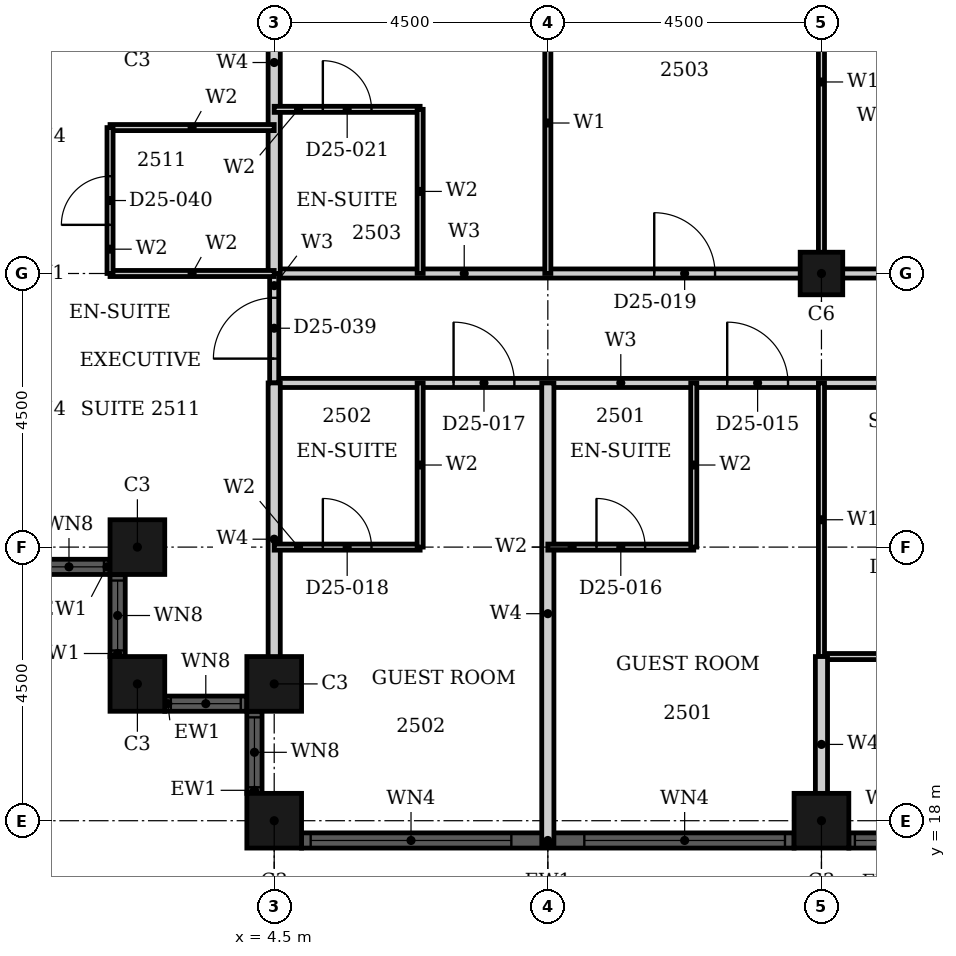
"""IFC4 building model, lengths in metres.
Left out: names, types, materials, properties, quantities, classifications, styles, units other than length and angle.
Written with IfcOpenShell. Run it as: python <this file> out.ifc"""

import sys

from ifc_helpers import new_model, si_unit, direction, frame, frame_2d, origin, origin_2d, place, context, subcontext, project, spatial, rectangle, hollow_rectangle, extrude, element, fill, save


model = new_model("IFC4")
c1 = context("Model", 3, precision=1e-05, world=origin(), true_north=direction((0.0, 1.0)))
c2 = subcontext(c1, "Body", "Model", "MODEL_VIEW")
j1 = project(units=[si_unit("LENGTHUNIT", "METRE"), si_unit("PLANEANGLEUNIT", "RADIAN")], contexts=[c1])
p1 = place(None, origin())
s1 = spatial("IfcSite", under=j1, at=p1, CompositionType="ELEMENT")
p2 = place(p1, origin())
s2 = spatial("IfcBuilding", under=s1, at=p2, CompositionType="ELEMENT")
p3 = place(p2, frame((0.0, 0.0, 104.4)))
s3 = spatial("IfcBuildingStorey", under=s2, at=p3, CompositionType="ELEMENT", Elevation=104.4)
for number, where, z_axis, x_axis in (
    (1, (2.25, 22.5, 0.0), (0.0, 0.0, 1.0), (1.0, 0.0, 0.0)),
    (2, (2.25, 20.25, 0.0), (0.0, 0.0, 1.0), (1.0, 0.0, 0.0)),
    (3, (4.5, 20.25, 0.0), (0.0, 0.0, 1.0), (1.0, 0.0, 0.0)),
    (4, (4.5, 18.0, 0.0), (0.0, 0.0, 1.0), (1.0, 0.0, 0.0)),
    (5, (13.5, 18.0, 0.0), (0.0, 0.0, 1.0), (1.0, 0.0, 0.0)),
):
    element("IfcColumn", number, at=place(p3, frame(where, z_axis=z_axis, x_axis=x_axis)), inside=s3, PredefinedType="COLUMN", context=c2, shape_type="SweptSolid", body=[
        extrude(hollow_rectangle(XDim=0.9, YDim=0.9, WallThickness=0.028, at=origin_2d()), origin(), (0.0, 0.0, 1.0), 3.6),
    ])
p4 = place(p3, frame((13.5, 27.0, 0.0), z_axis=(0.0, 0.0, 1.0), x_axis=(1.0, 0.0, 0.0)))
e6 = element("IfcColumn", 6, at=p4, inside=s3, PredefinedType="COLUMN", context=c2, shape_type="SweptSolid", body=[
    extrude(hollow_rectangle(XDim=0.7, YDim=0.7, WallThickness=0.022, at=origin_2d()), origin(), (0.0, 0.0, 1.0), 3.6),
])
p5 = place(p3, frame((0.45, 22.175, 0.0), z_axis=(0.0, 0.0, 1.0), x_axis=(1.0, 0.0, 0.0)))
e7 = element("IfcWall", 7, at=p5, inside=s3, PredefinedType="SOLIDWALL", context=c2, shape_type="SweptSolid", body=[
    extrude(rectangle(XDim=1.35, YDim=0.25, at=frame_2d((0.675, 0.0))), origin(), (0.0, 0.0, 1.0), 3.6),
])
p6 = place(p5, frame((0.1, 0.0, 0.9)))
e8 = element("IfcOpeningElement", 8, at=p6, cuts=e7, PredefinedType="OPENING", context=c2, shape_type="SweptSolid", body=[
    extrude(rectangle(XDim=1.15, YDim=2.08, at=frame_2d((0.575, 1.04))), frame((0.0, 0.135, 0.0), z_axis=(0.0, -1.0, 0.0), x_axis=(1.0, 0.0, 0.0)), (0.0, 0.0, 1.0), 0.27),
])
p7 = place(p3, frame((1.925, 22.05, 0.0), z_axis=(0.0, 0.0, 1.0), x_axis=(0.0, -1.0, 0.0)))
e9 = element("IfcWall", 9, at=p7, inside=s3, PredefinedType="SOLIDWALL", context=c2, shape_type="SweptSolid", body=[
    extrude(rectangle(XDim=1.35, YDim=0.25, at=frame_2d((0.675, 0.0))), origin(), (0.0, 0.0, 1.0), 3.6),
])
p8 = place(p7, frame((0.1, 0.0, 0.9)))
e10 = element("IfcOpeningElement", 10, at=p8, cuts=e9, PredefinedType="OPENING", context=c2, shape_type="SweptSolid", body=[
    extrude(rectangle(XDim=1.15, YDim=2.08, at=frame_2d((0.575, 1.04))), frame((0.0, 0.135, 0.0), z_axis=(0.0, -1.0, 0.0), x_axis=(1.0, 0.0, 0.0)), (0.0, 0.0, 1.0), 0.27),
])
p9 = place(p3, frame((2.7, 19.925, 0.0), z_axis=(0.0, 0.0, 1.0), x_axis=(1.0, 0.0, 0.0)))
e11 = element("IfcWall", 11, at=p9, inside=s3, PredefinedType="SOLIDWALL", context=c2, shape_type="SweptSolid", body=[
    extrude(rectangle(XDim=1.35, YDim=0.25, at=frame_2d((0.675, 0.0))), origin(), (0.0, 0.0, 1.0), 3.6),
])
p10 = place(p9, frame((0.1, 0.0, 0.9)))
e12 = element("IfcOpeningElement", 12, at=p10, cuts=e11, PredefinedType="OPENING", context=c2, shape_type="SweptSolid", body=[
    extrude(rectangle(XDim=1.15, YDim=2.08, at=frame_2d((0.575, 1.04))), frame((0.0, 0.135, 0.0), z_axis=(0.0, -1.0, 0.0), x_axis=(1.0, 0.0, 0.0)), (0.0, 0.0, 1.0), 0.27),
])
p11 = place(p3, frame((4.175, 19.8, 0.0), z_axis=(0.0, 0.0, 1.0), x_axis=(0.0, -1.0, 0.0)))
e13 = element("IfcWall", 13, at=p11, inside=s3, PredefinedType="SOLIDWALL", context=c2, shape_type="SweptSolid", body=[
    extrude(rectangle(XDim=1.35, YDim=0.25, at=frame_2d((0.675, 0.0))), origin(), (0.0, 0.0, 1.0), 3.6),
])
p12 = place(p11, frame((0.1, 0.0, 0.9)))
e14 = element("IfcOpeningElement", 14, at=p12, cuts=e13, PredefinedType="OPENING", context=c2, shape_type="SweptSolid", body=[
    extrude(rectangle(XDim=1.15, YDim=2.08, at=frame_2d((0.575, 1.04))), frame((0.0, 0.135, 0.0), z_axis=(0.0, -1.0, 0.0), x_axis=(1.0, 0.0, 0.0)), (0.0, 0.0, 1.0), 0.27),
])
p13 = place(p3, frame((4.95, 17.675, 0.0), z_axis=(0.0, 0.0, 1.0), x_axis=(1.0, 0.0, 0.0)))
e15 = element("IfcWall", 15, at=p13, inside=s3, PredefinedType="SOLIDWALL", context=c2, shape_type="SweptSolid", body=[
    extrude(rectangle(XDim=8.1, YDim=0.25, at=frame_2d((4.05, 0.0))), origin(), (0.0, 0.0, 1.0), 3.6),
])
p14 = place(p13, frame((0.15, 0.0, 0.9)))
e16 = element("IfcOpeningElement", 16, at=p14, cuts=e15, PredefinedType="OPENING", context=c2, shape_type="SweptSolid", body=[
    extrude(rectangle(XDim=3.3, YDim=2.08, at=frame_2d((1.65, 1.04))), frame((0.0, 0.135, 0.0), z_axis=(0.0, -1.0, 0.0), x_axis=(1.0, 0.0, 0.0)), (0.0, 0.0, 1.0), 0.27),
])
p15 = place(p13, frame((4.65, 0.0, 0.9)))
e17 = element("IfcOpeningElement", 17, at=p15, cuts=e15, PredefinedType="OPENING", context=c2, shape_type="SweptSolid", body=[
    extrude(rectangle(XDim=3.3, YDim=2.08, at=frame_2d((1.65, 1.04))), frame((0.0, 0.135, 0.0), z_axis=(0.0, -1.0, 0.0), x_axis=(1.0, 0.0, 0.0)), (0.0, 0.0, 1.0), 0.27),
])
p16 = place(p3, frame((13.95, 17.675, 0.0), z_axis=(0.0, 0.0, 1.0), x_axis=(1.0, 0.0, 0.0)))
e18 = element("IfcWall", 18, at=p16, inside=s3, PredefinedType="SOLIDWALL", context=c2, shape_type="SweptSolid", body=[
    extrude(rectangle(XDim=1.35, YDim=0.25, at=frame_2d((0.675, 0.0))), origin(), (0.0, 0.0, 1.0), 3.6),
])
p17 = place(p16, frame((0.1, 0.0, 0.9)))
e19 = element("IfcOpeningElement", 19, at=p17, cuts=e18, PredefinedType="OPENING", context=c2, shape_type="SweptSolid", body=[
    extrude(rectangle(XDim=1.15, YDim=2.08, at=frame_2d((0.575, 1.04))), frame((0.0, 0.135, 0.0), z_axis=(0.0, -1.0, 0.0), x_axis=(1.0, 0.0, 0.0)), (0.0, 0.0, 1.0), 0.27),
])
p18 = place(p3, frame((4.5, 25.2, 0.0), z_axis=(0.0, 0.0, 1.0), x_axis=(1.0, 0.0, 0.0)))
e20 = element("IfcWall", 20, at=p18, inside=s3, PredefinedType="PARTITIONING", context=c2, shape_type="SweptSolid", body=[
    extrude(rectangle(XDim=11.7, YDim=0.15, at=frame_2d((5.85, 0.0))), origin(), (0.0, 0.0, 1.0), 3.3),
])
p19 = place(p18, frame((7.45, 0.0, 0.0)))
e21 = element("IfcOpeningElement", 21, at=p19, cuts=e20, PredefinedType="OPENING", context=c2, shape_type="SweptSolid", body=[
    extrude(rectangle(XDim=1.0, YDim=2.1, at=frame_2d((0.5, 1.05))), frame((0.0, 0.085, 0.0), z_axis=(0.0, -1.0, 0.0), x_axis=(1.0, 0.0, 0.0)), (0.0, 0.0, 1.0), 0.17),
])
p20 = place(p18, frame((2.95, 0.0, 0.0)))
e22 = element("IfcOpeningElement", 22, at=p20, cuts=e20, PredefinedType="OPENING", context=c2, shape_type="SweptSolid", body=[
    extrude(rectangle(XDim=1.0, YDim=2.1, at=frame_2d((0.5, 1.05))), frame((0.0, 0.085, 0.0), z_axis=(0.0, -1.0, 0.0), x_axis=(1.0, 0.0, 0.0)), (0.0, 0.0, 1.0), 0.17),
])
p21 = place(p3, frame((4.5, 27.0, 0.0), z_axis=(0.0, 0.0, 1.0), x_axis=(1.0, 0.0, 0.0)))
e23 = element("IfcWall", 23, at=p21, inside=s3, PredefinedType="PARTITIONING", context=c2, shape_type="SweptSolid", body=[
    extrude(rectangle(XDim=11.7, YDim=0.15, at=frame_2d((5.85, 0.0))), origin(), (0.0, 0.0, 1.0), 2.58),
])
p22 = place(p21, frame((6.25, 0.0, 0.0)))
e24 = element("IfcOpeningElement", 24, at=p22, cuts=e23, PredefinedType="OPENING", context=c2, shape_type="SweptSolid", body=[
    extrude(rectangle(XDim=1.0, YDim=2.1, at=frame_2d((0.5, 1.05))), frame((0.0, 0.085, 0.0), z_axis=(0.0, -1.0, 0.0), x_axis=(1.0, 0.0, 0.0)), (0.0, 0.0, 1.0), 0.17),
])
p23 = place(p3, frame((4.5, 25.2, 0.0), z_axis=(0.0, 0.0, 1.0), x_axis=(0.0, 1.0, 0.0)))
e25 = element("IfcWall", 25, at=p23, inside=s3, PredefinedType="PARTITIONING", context=c2, shape_type="SweptSolid", body=[
    extrude(rectangle(XDim=1.8, YDim=0.15, at=frame_2d((0.9, 0.0))), origin(), (0.0, 0.0, 1.0), 3.3),
])
p24 = place(p23, frame((0.4, 0.0, 0.0)))
e26 = element("IfcOpeningElement", 26, at=p24, cuts=e25, PredefinedType="OPENING", context=c2, shape_type="SweptSolid", body=[
    extrude(rectangle(XDim=1.0, YDim=2.1, at=frame_2d((0.5, 1.05))), frame((0.0, 0.085, 0.0), z_axis=(0.0, -1.0, 0.0), x_axis=(1.0, 0.0, 0.0)), (0.0, 0.0, 1.0), 0.17),
])
p25 = place(p3, frame((13.5, 20.7, 0.0), z_axis=(0.0, 0.0, 1.0), x_axis=(1.0, 0.0, 0.0)))
e27 = element("IfcWall", 27, at=p25, inside=s3, PredefinedType="PARTITIONING", context=c2, shape_type="SweptSolid", body=[
    extrude(rectangle(XDim=2.7, YDim=0.1, at=frame_2d((1.35, 0.0))), origin(), (0.0, 0.0, 1.0), 3.3),
])
p26 = place(p3, frame((13.5, 20.7, 0.0), z_axis=(0.0, 0.0, 1.0), x_axis=(0.0, 1.0, 0.0)))
e28 = element("IfcWall", 28, at=p26, inside=s3, PredefinedType="PARTITIONING", context=c2, shape_type="SweptSolid", body=[
    extrude(rectangle(XDim=4.5, YDim=0.1, at=frame_2d((2.25, 0.0))), origin(), (0.0, 0.0, 1.0), 2.38),
])
p27 = place(p3, frame((13.5, 27.0, 0.0), z_axis=(0.0, 0.0, 1.0), x_axis=(0.0, 1.0, 0.0)))
e29 = element("IfcWall", 29, at=p27, inside=s3, PredefinedType="PARTITIONING", context=c2, shape_type="SweptSolid", body=[
    extrude(rectangle(XDim=6.3, YDim=0.1, at=frame_2d((3.15, 0.0))), origin(), (0.0, 0.0, 1.0), 2.38),
])
p28 = place(p3, frame((9.0, 27.0, 0.0), z_axis=(0.0, 0.0, 1.0), x_axis=(0.0, 1.0, 0.0)))
e30 = element("IfcWall", 30, at=p28, inside=s3, PredefinedType="PARTITIONING", context=c2, shape_type="SweptSolid", body=[
    extrude(rectangle(XDim=9.39, YDim=0.1, at=frame_2d((4.695, 0.0))), origin(), (0.0, 0.0, 1.0), 3.3),
])
p29 = place(p28, frame((4.95, 0.0, 0.0)))
e31 = element("IfcOpeningElement", 31, at=p29, cuts=e30, PredefinedType="OPENING", context=c2, shape_type="SweptSolid", body=[
    extrude(rectangle(XDim=0.9, YDim=2.1, at=frame_2d((0.45, 1.05))), frame((0.0, 0.06, 0.0), z_axis=(0.0, -1.0, 0.0), x_axis=(1.0, 0.0, 0.0)), (0.0, 0.0, 1.0), 0.12),
])
p30 = place(p3, frame((13.5, 17.81, 0.0), z_axis=(0.0, 0.0, 1.0), x_axis=(0.0, 1.0, 0.0)))
e32 = element("IfcWall", 32, at=p30, inside=s3, PredefinedType="PARTITIONING", context=c2, shape_type="SweptSolid", body=[
    extrude(rectangle(XDim=2.89, YDim=0.2, at=frame_2d((1.445, 0.0))), origin(), (0.0, 0.0, 1.0), 2.38),
])
p31 = place(p3, frame((4.5, 20.06, 0.0), z_axis=(0.0, 0.0, 1.0), x_axis=(0.0, 1.0, 0.0)))
e33 = element("IfcWall", 33, at=p31, inside=s3, PredefinedType="PARTITIONING", context=c2, shape_type="SweptSolid", body=[
    extrude(rectangle(XDim=5.14, YDim=0.2, at=frame_2d((2.57, 0.0))), origin(), (0.0, 0.0, 1.0), 3.3),
])
p32 = place(p3, frame((4.5, 27.0, 0.0), z_axis=(0.0, 0.0, 1.0), x_axis=(0.0, 1.0, 0.0)))
e34 = element("IfcWall", 34, at=p32, inside=s3, PredefinedType="PARTITIONING", context=c2, shape_type="SweptSolid", body=[
    extrude(rectangle(XDim=6.94, YDim=0.2, at=frame_2d((3.47, 0.0))), origin(), (0.0, 0.0, 1.0), 3.3),
])
p33 = place(p3, frame((9.0, 17.61, 0.0), z_axis=(0.0, 0.0, 1.0), x_axis=(0.0, 1.0, 0.0)))
e35 = element("IfcWall", 35, at=p33, inside=s3, PredefinedType="PARTITIONING", context=c2, shape_type="SweptSolid", body=[
    extrude(rectangle(XDim=7.59, YDim=0.2, at=frame_2d((3.795, 0.0))), origin(), (0.0, 0.0, 1.0), 3.3),
])
p34 = place(p3, frame((9.0, 22.5, 0.0), z_axis=(0.0, 0.0, 1.0), x_axis=(1.0, 0.0, 0.0)))
e36 = element("IfcWall", 36, at=p34, inside=s3, PredefinedType="PARTITIONING", context=c2, shape_type="SweptSolid", body=[
    extrude(rectangle(XDim=2.4, YDim=0.1, at=frame_2d((1.2, 0.0))), origin(), (0.0, 0.0, 1.0), 2.58),
])
p35 = place(p34, frame((0.8, 0.0, 0.0)))
e37 = element("IfcOpeningElement", 37, at=p35, cuts=e36, PredefinedType="OPENING", context=c2, shape_type="SweptSolid", body=[
    extrude(rectangle(XDim=0.8, YDim=2.1, at=frame_2d((0.4, 1.05))), frame((0.0, 0.06, 0.0), z_axis=(0.0, -1.0, 0.0), x_axis=(1.0, 0.0, 0.0)), (0.0, 0.0, 1.0), 0.12),
])
p36 = place(p3, frame((4.5, 22.5, 0.0), z_axis=(0.0, 0.0, 1.0), x_axis=(1.0, 0.0, 0.0)))
e38 = element("IfcWall", 38, at=p36, inside=s3, PredefinedType="PARTITIONING", context=c2, shape_type="SweptSolid", body=[
    extrude(rectangle(XDim=2.4, YDim=0.1, at=frame_2d((1.2, 0.0))), origin(), (0.0, 0.0, 1.0), 2.58),
])
p37 = place(p36, frame((0.8, 0.0, 0.0)))
e39 = element("IfcOpeningElement", 39, at=p37, cuts=e38, PredefinedType="OPENING", context=c2, shape_type="SweptSolid", body=[
    extrude(rectangle(XDim=0.8, YDim=2.1, at=frame_2d((0.4, 1.05))), frame((0.0, 0.06, 0.0), z_axis=(0.0, -1.0, 0.0), x_axis=(1.0, 0.0, 0.0)), (0.0, 0.0, 1.0), 0.12),
])
p38 = place(p3, frame((1.8, 27.0, 0.0), z_axis=(0.0, 0.0, 1.0), x_axis=(1.0, 0.0, 0.0)))
e40 = element("IfcWall", 40, at=p38, inside=s3, PredefinedType="PARTITIONING", context=c2, shape_type="SweptSolid", body=[
    extrude(rectangle(XDim=2.7, YDim=0.1, at=frame_2d((1.35, 0.0))), origin(), (0.0, 0.0, 1.0), 2.58),
])
p39 = place(p3, frame((1.8, 29.4, 0.0), z_axis=(0.0, 0.0, 1.0), x_axis=(1.0, 0.0, 0.0)))
e41 = element("IfcWall", 41, at=p39, inside=s3, PredefinedType="PARTITIONING", context=c2, shape_type="SweptSolid", body=[
    extrude(rectangle(XDim=2.7, YDim=0.1, at=frame_2d((1.35, 0.0))), origin(), (0.0, 0.0, 1.0), 3.3),
])
p40 = place(p3, frame((4.5, 29.7, 0.0), z_axis=(0.0, 0.0, 1.0), x_axis=(1.0, 0.0, 0.0)))
e42 = element("IfcWall", 42, at=p40, inside=s3, PredefinedType="PARTITIONING", context=c2, shape_type="SweptSolid", body=[
    extrude(rectangle(XDim=2.4, YDim=0.1, at=frame_2d((1.2, 0.0))), origin(), (0.0, 0.0, 1.0), 3.3),
])
p41 = place(p40, frame((0.8, 0.0, 0.0)))
e43 = element("IfcOpeningElement", 43, at=p41, cuts=e42, PredefinedType="OPENING", context=c2, shape_type="SweptSolid", body=[
    extrude(rectangle(XDim=0.8, YDim=2.1, at=frame_2d((0.4, 1.05))), frame((0.0, 0.06, 0.0), z_axis=(0.0, -1.0, 0.0), x_axis=(1.0, 0.0, 0.0)), (0.0, 0.0, 1.0), 0.12),
])
p42 = place(p3, frame((1.8, 27.0, 0.0), z_axis=(0.0, 0.0, 1.0), x_axis=(0.0, 1.0, 0.0)))
e44 = element("IfcWall", 44, at=p42, inside=s3, PredefinedType="PARTITIONING", context=c2, shape_type="SweptSolid", body=[
    extrude(rectangle(XDim=2.4, YDim=0.1, at=frame_2d((1.2, 0.0))), origin(), (0.0, 0.0, 1.0), 3.3),
])
p43 = place(p42, frame((0.8, 0.0, 0.0)))
e45 = element("IfcOpeningElement", 45, at=p43, cuts=e44, PredefinedType="OPENING", context=c2, shape_type="SweptSolid", body=[
    extrude(rectangle(XDim=0.8, YDim=2.1, at=frame_2d((0.4, 1.05))), frame((0.0, 0.06, 0.0), z_axis=(0.0, -1.0, 0.0), x_axis=(1.0, 0.0, 0.0)), (0.0, 0.0, 1.0), 0.12),
])
for number, where, z_axis, x_axis in (
    (46, (11.4, 22.5, 0.0), (0.0, 0.0, 1.0), (0.0, 1.0, 0.0)),
    (47, (6.9, 22.5, 0.0), (0.0, 0.0, 1.0), (0.0, 1.0, 0.0)),
    (48, (6.9, 27.0, 0.0), (0.0, 0.0, 1.0), (0.0, 1.0, 0.0)),
):
    element("IfcWall", number, at=place(p3, frame(where, z_axis=z_axis, x_axis=x_axis)), inside=s3, PredefinedType="PARTITIONING", context=c2, shape_type="SweptSolid", body=[
        extrude(rectangle(XDim=2.7, YDim=0.1, at=frame_2d((1.35, 0.0))), origin(), (0.0, 0.0, 1.0), 3.3),
    ])
p44 = place(p6, origin())
e49 = element("IfcWindow", 49, at=p44, inside=s3, PartitioningType="SINGLE_PANEL", PredefinedType="WINDOW", context=c2, shape_type="SweptSolid", body=[
    extrude(rectangle(XDim=1.15, YDim=2.08, at=frame_2d((0.575, 1.04))), frame((0.0, 0.03, 0.0), z_axis=(0.0, -1.0, 0.0), x_axis=(1.0, 0.0, 0.0)), (0.0, 0.0, 1.0), 0.06),
])
fill(e8, e49)
p45 = place(p8, origin())
e50 = element("IfcWindow", 50, at=p45, inside=s3, PartitioningType="SINGLE_PANEL", PredefinedType="WINDOW", context=c2, shape_type="SweptSolid", body=[
    extrude(rectangle(XDim=1.15, YDim=2.08, at=frame_2d((0.575, 1.04))), frame((0.0, 0.03, 0.0), z_axis=(0.0, -1.0, 0.0), x_axis=(1.0, 0.0, 0.0)), (0.0, 0.0, 1.0), 0.06),
])
fill(e10, e50)
p46 = place(p10, origin())
e51 = element("IfcWindow", 51, at=p46, inside=s3, PartitioningType="SINGLE_PANEL", PredefinedType="WINDOW", context=c2, shape_type="SweptSolid", body=[
    extrude(rectangle(XDim=1.15, YDim=2.08, at=frame_2d((0.575, 1.04))), frame((0.0, 0.03, 0.0), z_axis=(0.0, -1.0, 0.0), x_axis=(1.0, 0.0, 0.0)), (0.0, 0.0, 1.0), 0.06),
])
fill(e12, e51)
p47 = place(p12, origin())
e52 = element("IfcWindow", 52, at=p47, inside=s3, PartitioningType="SINGLE_PANEL", PredefinedType="WINDOW", context=c2, shape_type="SweptSolid", body=[
    extrude(rectangle(XDim=1.15, YDim=2.08, at=frame_2d((0.575, 1.04))), frame((0.0, 0.03, 0.0), z_axis=(0.0, -1.0, 0.0), x_axis=(1.0, 0.0, 0.0)), (0.0, 0.0, 1.0), 0.06),
])
fill(e14, e52)
p48 = place(p14, origin())
e53 = element("IfcWindow", 53, at=p48, inside=s3, PartitioningType="SINGLE_PANEL", PredefinedType="WINDOW", context=c2, shape_type="SweptSolid", body=[
    extrude(rectangle(XDim=3.3, YDim=2.08, at=frame_2d((1.65, 1.04))), frame((0.0, 0.03, 0.0), z_axis=(0.0, -1.0, 0.0), x_axis=(1.0, 0.0, 0.0)), (0.0, 0.0, 1.0), 0.06),
])
fill(e16, e53)
p49 = place(p15, origin())
e54 = element("IfcWindow", 54, at=p49, inside=s3, PartitioningType="SINGLE_PANEL", PredefinedType="WINDOW", context=c2, shape_type="SweptSolid", body=[
    extrude(rectangle(XDim=3.3, YDim=2.08, at=frame_2d((1.65, 1.04))), frame((0.0, 0.03, 0.0), z_axis=(0.0, -1.0, 0.0), x_axis=(1.0, 0.0, 0.0)), (0.0, 0.0, 1.0), 0.06),
])
fill(e17, e54)
p50 = place(p17, origin())
e55 = element("IfcWindow", 55, at=p50, inside=s3, PartitioningType="SINGLE_PANEL", PredefinedType="WINDOW", context=c2, shape_type="SweptSolid", body=[
    extrude(rectangle(XDim=1.15, YDim=2.08, at=frame_2d((0.575, 1.04))), frame((0.0, 0.03, 0.0), z_axis=(0.0, -1.0, 0.0), x_axis=(1.0, 0.0, 0.0)), (0.0, 0.0, 1.0), 0.06),
])
fill(e19, e55)
p51 = place(p19, origin())
e56 = element("IfcDoor", 56, at=p51, inside=s3, OperationType="SINGLE_SWING_RIGHT", PredefinedType="DOOR", context=c2, shape_type="SweptSolid", body=[
    extrude(rectangle(XDim=1.0, YDim=2.1, at=frame_2d((0.5, 1.05))), frame((0.0, 0.025, 0.0), z_axis=(0.0, -1.0, 0.0), x_axis=(1.0, 0.0, 0.0)), (0.0, 0.0, 1.0), 0.05),
])
fill(e21, e56)
p52 = place(p35, origin())
e57 = element("IfcDoor", 57, at=p52, inside=s3, OperationType="SINGLE_SWING_LEFT", PredefinedType="DOOR", context=c2, shape_type="SweptSolid", body=[
    extrude(rectangle(XDim=0.8, YDim=2.1, at=frame_2d((0.4, 1.05))), frame((0.0, 0.025, 0.0), z_axis=(0.0, -1.0, 0.0), x_axis=(1.0, 0.0, 0.0)), (0.0, 0.0, 1.0), 0.05),
])
fill(e37, e57)
p53 = place(p20, origin())
e58 = element("IfcDoor", 58, at=p53, inside=s3, OperationType="SINGLE_SWING_RIGHT", PredefinedType="DOOR", context=c2, shape_type="SweptSolid", body=[
    extrude(rectangle(XDim=1.0, YDim=2.1, at=frame_2d((0.5, 1.05))), frame((0.0, 0.025, 0.0), z_axis=(0.0, -1.0, 0.0), x_axis=(1.0, 0.0, 0.0)), (0.0, 0.0, 1.0), 0.05),
])
fill(e22, e58)
p54 = place(p37, origin())
e59 = element("IfcDoor", 59, at=p54, inside=s3, OperationType="SINGLE_SWING_RIGHT", PredefinedType="DOOR", context=c2, shape_type="SweptSolid", body=[
    extrude(rectangle(XDim=0.8, YDim=2.1, at=frame_2d((0.4, 1.05))), frame((0.0, 0.025, 0.0), z_axis=(0.0, -1.0, 0.0), x_axis=(1.0, 0.0, 0.0)), (0.0, 0.0, 1.0), 0.05),
])
fill(e39, e59)
p55 = place(p22, origin())
e60 = element("IfcDoor", 60, at=p55, inside=s3, OperationType="SINGLE_SWING_LEFT", PredefinedType="DOOR", context=c2, shape_type="SweptSolid", body=[
    extrude(rectangle(XDim=1.0, YDim=2.1, at=frame_2d((0.5, 1.05))), frame((0.0, 0.025, 0.0), z_axis=(0.0, -1.0, 0.0), x_axis=(1.0, 0.0, 0.0)), (0.0, 0.0, 1.0), 0.05),
])
fill(e24, e60)
p56 = place(p41, origin())
e61 = element("IfcDoor", 61, at=p56, inside=s3, OperationType="SINGLE_SWING_LEFT", PredefinedType="DOOR", context=c2, shape_type="SweptSolid", body=[
    extrude(rectangle(XDim=0.8, YDim=2.1, at=frame_2d((0.4, 1.05))), frame((0.0, 0.025, 0.0), z_axis=(0.0, -1.0, 0.0), x_axis=(1.0, 0.0, 0.0)), (0.0, 0.0, 1.0), 0.05),
])
fill(e43, e61)
p57 = place(p24, origin())
e62 = element("IfcDoor", 62, at=p57, inside=s3, OperationType="SINGLE_SWING_RIGHT", PredefinedType="DOOR", context=c2, shape_type="SweptSolid", body=[
    extrude(rectangle(XDim=1.0, YDim=2.1, at=frame_2d((0.5, 1.05))), frame((0.0, 0.025, 0.0), z_axis=(0.0, -1.0, 0.0), x_axis=(1.0, 0.0, 0.0)), (0.0, 0.0, 1.0), 0.05),
])
fill(e26, e62)
p58 = place(p43, origin())
e63 = element("IfcDoor", 63, at=p58, inside=s3, OperationType="SINGLE_SWING_LEFT", PredefinedType="DOOR", context=c2, shape_type="SweptSolid", body=[
    extrude(rectangle(XDim=0.8, YDim=2.1, at=frame_2d((0.4, 1.05))), frame((0.0, 0.025, 0.0), z_axis=(0.0, -1.0, 0.0), x_axis=(1.0, 0.0, 0.0)), (0.0, 0.0, 1.0), 0.05),
])
fill(e45, e63)
save(model, sys.argv[1])
